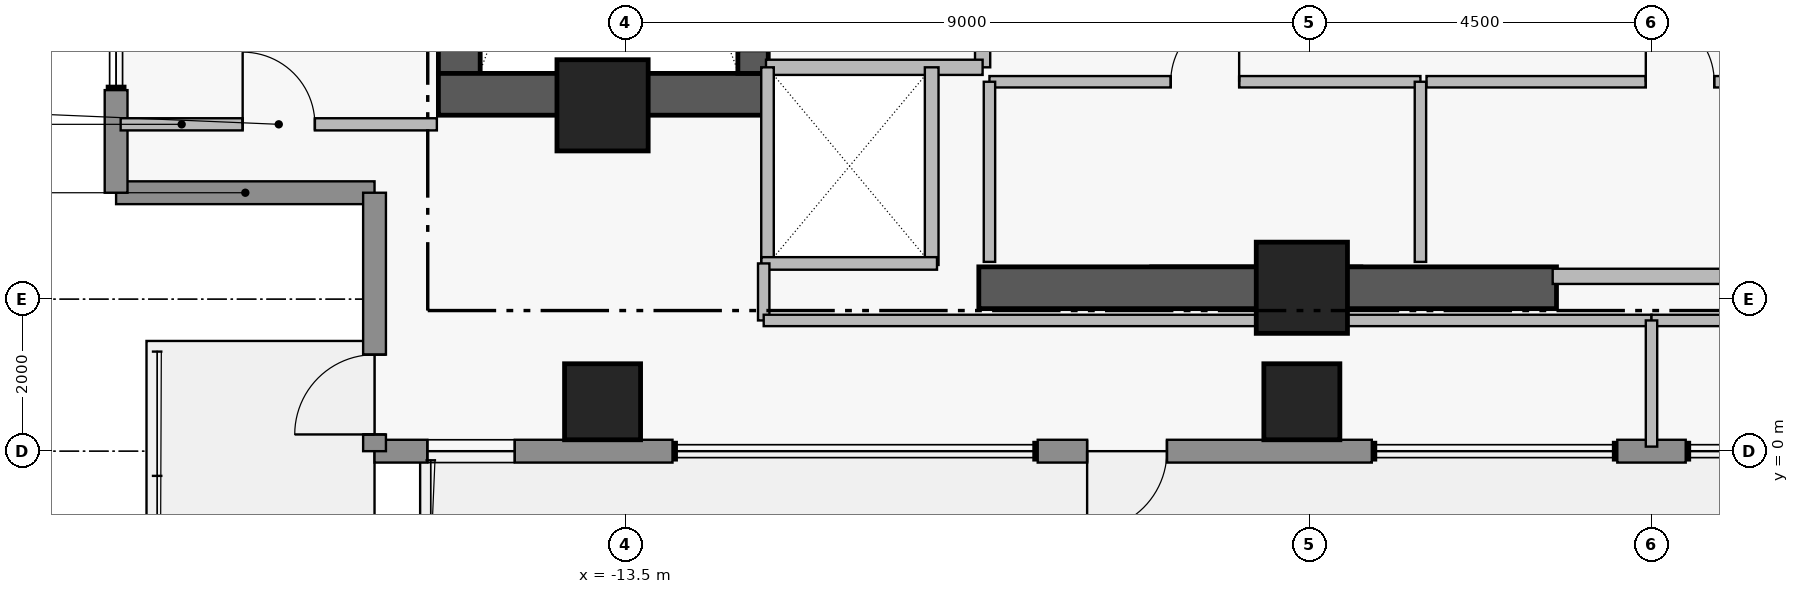
"""IFC4 building model, lengths in metres.
Left out: names, types, materials, properties, quantities, classifications, styles, units other than length and angle.
Written with IfcOpenShell. Run it as: python <this file> out.ifc"""

import sys

from ifc_helpers import new_model, si_unit, direction, frame, frame_2d, origin, origin_2d, place, context, subcontext, project, spatial, rectangle, extrude, element, fill, save


model = new_model("IFC4")
c1 = context("Model", 3, precision=1e-05, world=origin(), true_north=direction((0.0, 1.0)))
c2 = subcontext(c1, "Body", "Model", "MODEL_VIEW")
j1 = project(units=[si_unit("LENGTHUNIT", "METRE"), si_unit("PLANEANGLEUNIT", "RADIAN")], contexts=[c1])
p1 = place(None, origin())
s1 = spatial("IfcSite", under=j1, at=p1, CompositionType="ELEMENT")
p2 = place(p1, origin())
s2 = spatial("IfcBuilding", under=s1, at=p2, CompositionType="ELEMENT")
p3 = place(p2, frame((0.0, 0.0, 280.35)))
s3 = spatial("IfcBuildingStorey", under=s2, at=p3, CompositionType="ELEMENT", Elevation=280.35)
p4 = place(p3, frame((-15.685, 4.97, 0.0), z_axis=(0.0, 0.0, 1.0), x_axis=(0.0, 1.0, 0.0)))
e1 = element("IfcWall", 1, at=p4, inside=s3, PredefinedType="SHEAR", context=c2, shape_type="SweptSolid", body=[
    extrude(rectangle(XDim=8.96, YDim=0.55, at=frame_2d((4.48, 0.0))), origin(), (0.0, 0.0, 1.0), 3.51),
])
p5 = place(p3, frame((-15.96, 4.695, 0.0), z_axis=(0.0, 0.0, 1.0), x_axis=(1.0, 0.0, 0.0)))
e2 = element("IfcWall", 2, at=p5, inside=s3, PredefinedType="SHEAR", context=c2, shape_type="SweptSolid", body=[
    extrude(rectangle(XDim=4.36, YDim=0.55, at=frame_2d((2.18, 0.0))), origin(), (0.0, 0.0, 1.0), 3.51),
])
p6 = place(p3, frame((-8.85, 2.15, 0.0), z_axis=(0.0, 0.0, 1.0), x_axis=(1.0, 0.0, 0.0)))
e3 = element("IfcWall", 3, at=p6, inside=s3, PredefinedType="SHEAR", context=c2, shape_type="SweptSolid", body=[
    extrude(rectangle(XDim=7.6, YDim=0.55, at=frame_2d((3.8, 0.0))), origin(), (0.0, 0.0, 1.0), 3.48),
])
p7 = place(p3, frame((-11.82, 4.97, 0.0), z_axis=(0.0, 0.0, 1.0), x_axis=(0.0, 1.0, 0.0)))
e4 = element("IfcWall", 4, at=p7, inside=s3, PredefinedType="SHEAR", context=c2, shape_type="SweptSolid", body=[
    extrude(rectangle(XDim=8.96, YDim=0.4, at=frame_2d((4.48, 0.0))), origin(), (0.0, 0.0, 1.0), 3.51),
])
p8 = place(p7, frame((0.31, 0.0, 0.0)))
e5 = element("IfcOpeningElement", 5, at=p8, cuts=e4, PredefinedType="OPENING", context=c2, shape_type="SweptSolid", body=[
    extrude(rectangle(XDim=1.12, YDim=2.22, at=frame_2d((0.56, 1.11))), frame((0.0, 0.21, 0.0), z_axis=(0.0, -1.0, 0.0), x_axis=(1.0, 0.0, 0.0)), (0.0, 0.0, 1.0), 0.42),
])
for number, where, z_axis, x_axis in (
    (6, (-13.8, 4.55, 0.0), (0.0, 0.0, 1.0), (1.0, 0.0, 0.0)),
    (7, (-4.6, 2.15, 0.0), (0.0, 0.0, 1.0), (1.0, 0.0, 0.0)),
):
    element("IfcColumn", number, at=place(p3, frame(where, z_axis=z_axis, x_axis=x_axis)), inside=s3, PredefinedType="COLUMN", context=c2, shape_type="SweptSolid", body=[
        extrude(rectangle(XDim=1.2, YDim=1.2, at=origin_2d()), origin(), (0.0, 0.0, 1.0), 3.7),
    ])
for number, where, z_axis, x_axis in (
    (8, (-13.8, 0.65, 0.0), (0.0, 0.0, 1.0), (1.0, 0.0, 0.0)),
    (9, (-4.6, 0.65, 0.0), (0.0, 0.0, 1.0), (1.0, 0.0, 0.0)),
):
    element("IfcColumn", number, at=place(p3, frame(where, z_axis=z_axis, x_axis=x_axis)), inside=s3, PredefinedType="COLUMN", context=c2, shape_type="SweptSolid", body=[
        extrude(rectangle(XDim=1.0, YDim=1.0, at=origin_2d()), origin(), (0.0, 0.0, 1.0), 3.7),
    ])
p9 = place(p3, frame((-16.8, 3.4, 0.0), z_axis=(0.0, 0.0, 1.0), x_axis=(-1.0, 0.0, 0.0)))
e10 = element("IfcWall", 10, at=p9, inside=s3, PredefinedType="STANDARD", context=c2, shape_type="SweptSolid", body=[
    extrude(rectangle(XDim=3.4, YDim=0.3, at=frame_2d((1.7, 0.0))), origin(), (0.0, 0.0, 1.0), 3.48),
])
p10 = place(p3, frame((-20.2, 3.4, 0.0), z_axis=(0.0, 0.0, 1.0), x_axis=(0.0, 1.0, 0.0)))
e11 = element("IfcWall", 11, at=p10, inside=s3, PredefinedType="STANDARD", context=c2, shape_type="SweptSolid", body=[
    extrude(rectangle(XDim=1.35, YDim=0.3, at=frame_2d((0.675, 0.0))), origin(), (0.0, 0.0, 1.0), 3.48),
])
p11 = place(p3, frame((0.45, 0.0, 0.0), z_axis=(0.0, 0.0, 1.0), x_axis=(-1.0, 0.0, 0.0)))
e12 = element("IfcWall", 12, at=p11, inside=s3, PredefinedType="STANDARD", context=c2, shape_type="SweptSolid", body=[
    extrude(rectangle(XDim=0.9, YDim=0.3, at=frame_2d((0.45, 0.0))), origin(), (0.0, 0.0, 1.0), 3.48),
])
p12 = place(p3, frame((-3.68, 0.0, 0.0), z_axis=(0.0, 0.0, 1.0), x_axis=(-1.0, 0.0, 0.0)))
e13 = element("IfcWall", 13, at=p12, inside=s3, PredefinedType="STANDARD", context=c2, shape_type="SweptSolid", body=[
    extrude(rectangle(XDim=4.395, YDim=0.3, at=frame_2d((2.198, 0.0))), origin(), (0.0, 0.0, 1.0), 3.48),
])
p13 = place(p12, frame((2.695, 0.0, 0.0)))
e14 = element("IfcOpeningElement", 14, at=p13, cuts=e13, PredefinedType="OPENING", context=c2, shape_type="SweptSolid", body=[
    extrude(rectangle(XDim=1.05, YDim=2.2, at=frame_2d((0.525, 1.1))), frame((0.0, 0.16, 0.0), z_axis=(0.0, -1.0, 0.0), x_axis=(1.0, 0.0, 0.0)), (0.0, 0.0, 1.0), 0.32),
])
p14 = place(p3, frame((-12.88, 0.0, 0.0), z_axis=(0.0, 0.0, 1.0), x_axis=(-1.0, 0.0, 0.0)))
e15 = element("IfcWall", 15, at=p14, inside=s3, PredefinedType="STANDARD", context=c2, shape_type="SweptSolid", body=[
    extrude(rectangle(XDim=3.92, YDim=0.3, at=frame_2d((1.96, 0.0))), origin(), (0.0, 0.0, 1.0), 3.48),
])
p15 = place(p14, frame((2.075, 0.0, 0.95)))
e16 = element("IfcOpeningElement", 16, at=p15, cuts=e15, PredefinedType="OPENING", context=c2, shape_type="SweptSolid", body=[
    extrude(rectangle(XDim=1.15, YDim=1.55, at=frame_2d((0.575, 0.775))), frame((0.0, 0.16, 0.0), z_axis=(0.0, -1.0, 0.0), x_axis=(1.0, 0.0, 0.0)), (0.0, 0.0, 1.0), 0.32),
])
p16 = place(p3, frame((-16.8, 0.0, 0.0), z_axis=(0.0, 0.0, 1.0), x_axis=(0.0, 1.0, 0.0)))
e17 = element("IfcWall", 17, at=p16, inside=s3, PredefinedType="STANDARD", context=c2, shape_type="SweptSolid", body=[
    extrude(rectangle(XDim=3.4, YDim=0.3, at=frame_2d((1.7, 0.0))), origin(), (0.0, 0.0, 1.0), 3.48),
])
p17 = place(p16, frame((0.22, 0.0, 0.0)))
e18 = element("IfcOpeningElement", 18, at=p17, cuts=e17, PredefinedType="OPENING", context=c2, shape_type="SweptSolid", body=[
    extrude(rectangle(XDim=1.05, YDim=2.2, at=frame_2d((0.525, 1.1))), frame((0.0, 0.16, 0.0), z_axis=(0.0, -1.0, 0.0), x_axis=(1.0, 0.0, 0.0)), (0.0, 0.0, 1.0), 0.32),
])
p18 = place(p3, frame((-8.8, 5.05, 0.0), z_axis=(0.0, 0.0, 1.0), x_axis=(0.0, 1.0, 0.0)))
e19 = element("IfcWall", 19, at=p18, inside=s3, PredefinedType="PARTITIONING", context=c2, shape_type="SweptSolid", body=[
    extrude(rectangle(XDim=6.1, YDim=0.2, at=frame_2d((3.05, 0.0))), origin(), (0.0, 0.0, 1.0), 3.48),
])
p19 = place(p18, frame((0.25, 0.0, 0.0)))
e20 = element("IfcOpeningElement", 20, at=p19, cuts=e19, PredefinedType="OPENING", context=c2, shape_type="SweptSolid", body=[
    extrude(rectangle(XDim=1.1, YDim=2.2, at=frame_2d((0.55, 1.1))), frame((0.0, 0.11, 0.0), z_axis=(0.0, -1.0, 0.0), x_axis=(1.0, 0.0, 0.0)), (0.0, 0.0, 1.0), 0.22),
])
p20 = place(p18, frame((3.85, 0.0, 0.0)))
e21 = element("IfcOpeningElement", 21, at=p20, cuts=e19, PredefinedType="OPENING", context=c2, shape_type="SweptSolid", body=[
    extrude(rectangle(XDim=1.1, YDim=2.2, at=frame_2d((0.55, 1.1))), frame((0.0, 0.11, 0.0), z_axis=(0.0, -1.0, 0.0), x_axis=(1.0, 0.0, 0.0)), (0.0, 0.0, 1.0), 0.22),
])
p21 = place(p3, frame((-8.71, 4.86, 0.0), z_axis=(0.0, 0.0, 1.0), x_axis=(1.0, 0.0, 0.0)))
e22 = element("IfcWall", 22, at=p21, inside=s3, PredefinedType="PARTITIONING", context=c2, shape_type="SweptSolid", body=[
    extrude(rectangle(XDim=5.67, YDim=0.15, at=frame_2d((2.835, 0.0))), origin(), (0.0, 0.0, 1.0), 3.48),
])
p22 = place(p21, frame((2.385, 0.0, 0.0)))
e23 = element("IfcOpeningElement", 23, at=p22, cuts=e22, PredefinedType="OPENING", context=c2, shape_type="SweptSolid", body=[
    extrude(rectangle(XDim=0.9, YDim=2.15, at=frame_2d((0.45, 1.075))), frame((0.0, 0.085, 0.0), z_axis=(0.0, -1.0, 0.0), x_axis=(1.0, 0.0, 0.0)), (0.0, 0.0, 1.0), 0.17),
])
p23 = place(p3, frame((-2.96, 4.86, 0.0), z_axis=(0.0, 0.0, 1.0), x_axis=(1.0, 0.0, 0.0)))
e24 = element("IfcWall", 24, at=p23, inside=s3, PredefinedType="PARTITIONING", context=c2, shape_type="SweptSolid", body=[
    extrude(rectangle(XDim=6.67, YDim=0.15, at=frame_2d((3.335, 0.0))), origin(), (0.0, 0.0, 1.0), 3.48),
])
p24 = place(p23, frame((2.885, 0.0, 0.0)))
e25 = element("IfcOpeningElement", 25, at=p24, cuts=e24, PredefinedType="OPENING", context=c2, shape_type="SweptSolid", body=[
    extrude(rectangle(XDim=0.9, YDim=2.15, at=frame_2d((0.45, 1.075))), frame((0.0, 0.085, 0.0), z_axis=(0.0, -1.0, 0.0), x_axis=(1.0, 0.0, 0.0)), (0.0, 0.0, 1.0), 0.17),
])
p25 = place(p3, frame((-20.14, 4.3, 0.0), z_axis=(0.0, 0.0, 1.0), x_axis=(1.0, 0.0, 0.0)))
e26 = element("IfcWall", 26, at=p25, inside=s3, PredefinedType="PARTITIONING", context=c2, shape_type="SweptSolid", body=[
    extrude(rectangle(XDim=4.16, YDim=0.16, at=frame_2d((2.08, 0.0))), origin(), (0.0, 0.0, 1.0), 3.48),
])
p26 = place(p25, frame((1.605, 0.0, 0.0)))
e27 = element("IfcOpeningElement", 27, at=p26, cuts=e26, PredefinedType="OPENING", context=c2, shape_type="SweptSolid", body=[
    extrude(rectangle(XDim=0.95, YDim=2.15, at=frame_2d((0.475, 1.075))), frame((0.0, 0.09, 0.0), z_axis=(0.0, -1.0, 0.0), x_axis=(1.0, 0.0, 0.0)), (0.0, 0.0, 1.0), 0.18),
])
p27 = place(p3, frame((-11.65, 5.05, 0.0), z_axis=(0.0, 0.0, 1.0), x_axis=(1.0, 0.0, 0.0)))
e28 = element("IfcWall", 28, at=p27, inside=s3, PredefinedType="PARTITIONING", context=c2, shape_type="SweptSolid", body=[
    extrude(rectangle(XDim=2.85, YDim=0.2, at=frame_2d((1.425, 0.0))), origin(), (0.0, 0.0, 1.0), 3.48),
])
p28 = place(p3, frame((-1.3, 2.3, 0.0), z_axis=(0.0, 0.0, 1.0), x_axis=(1.0, 0.0, 0.0)))
e29 = element("IfcWall", 29, at=p28, inside=s3, PredefinedType="PARTITIONING", context=c2, shape_type="SweptSolid", body=[
    extrude(rectangle(XDim=2.6, YDim=0.2, at=frame_2d((1.3, 0.0))), origin(), (0.0, 0.0, 1.0), 2.38),
])
for number, where, z_axis, x_axis in (
    (30, (-8.71, 2.49, 0.0), (0.0, 0.0, 1.0), (0.0, 1.0, 0.0)),
    (31, (-3.04, 2.49, 0.0), (0.0, 0.0, 1.0), (0.0, 1.0, 0.0)),
):
    element("IfcWall", number, at=place(p3, frame(where, z_axis=z_axis, x_axis=x_axis)), inside=s3, PredefinedType="PARTITIONING", context=c2, shape_type="SweptSolid", body=[
        extrude(rectangle(XDim=2.37, YDim=0.15, at=frame_2d((1.185, 0.0))), origin(), (0.0, 0.0, 1.0), 3.48),
    ])
p29 = place(p3, frame((-9.47, 2.45, 0.0), z_axis=(0.0, 0.0, 1.0), x_axis=(0.0, 1.0, 0.0)))
e32 = element("IfcWall", 32, at=p29, inside=s3, PredefinedType="PARTITIONING", context=c2, shape_type="SweptSolid", body=[
    extrude(rectangle(XDim=2.6, YDim=0.18, at=frame_2d((1.3, 0.0))), origin(), (0.0, 0.0, 1.0), 3.48),
])
p30 = place(p3, frame((-11.63, 2.47, 0.0), z_axis=(0.0, 0.0, 1.0), x_axis=(0.0, 1.0, 0.0)))
e33 = element("IfcWall", 33, at=p30, inside=s3, PredefinedType="PARTITIONING", context=c2, shape_type="SweptSolid", body=[
    extrude(rectangle(XDim=2.58, YDim=0.165, at=frame_2d((1.29, 0.0))), origin(), (0.0, 0.0, 1.0), 3.48),
])
p31 = place(p3, frame((-11.71, 2.47, 0.0), z_axis=(0.0, 0.0, 1.0), x_axis=(1.0, 0.0, 0.0)))
e34 = element("IfcWall", 34, at=p31, inside=s3, PredefinedType="PARTITIONING", context=c2, shape_type="SweptSolid", body=[
    extrude(rectangle(XDim=2.31, YDim=0.165, at=frame_2d((1.155, 0.0))), origin(), (0.0, 0.0, 1.0), 2.38),
])
p32 = place(p3, frame((-11.68, 1.72, 0.0), z_axis=(0.0, 0.0, 1.0), x_axis=(0.0, 1.0, 0.0)))
e35 = element("IfcWall", 35, at=p32, inside=s3, PredefinedType="PARTITIONING", context=c2, shape_type="SweptSolid", body=[
    extrude(rectangle(XDim=0.75, YDim=0.15, at=frame_2d((0.375, 0.0))), origin(), (0.0, 0.0, 1.0), 3.48),
])
for number, where, z_axis, x_axis in (
    (36, (-11.68, 1.72, 0.0), (0.0, 0.0, 1.0), (1.0, 0.0, 0.0)),
    (37, (0.0, 1.72, 0.0), (0.0, 0.0, 1.0), (1.0, 0.0, 0.0)),
):
    element("IfcWall", number, at=place(p3, frame(where, z_axis=z_axis, x_axis=x_axis)), inside=s3, PredefinedType="PARTITIONING", context=c2, shape_type="SweptSolid", body=[
        extrude(rectangle(XDim=11.68, YDim=0.15, at=frame_2d((5.84, 0.0))), origin(), (0.0, 0.0, 1.0), 2.38),
    ])
p33 = place(p3, frame((0.0, 0.06, 0.0), z_axis=(0.0, 0.0, 1.0), x_axis=(0.0, 1.0, 0.0)))
e38 = element("IfcWall", 38, at=p33, inside=s3, PredefinedType="PARTITIONING", context=c2, shape_type="SweptSolid", body=[
    extrude(rectangle(XDim=1.66, YDim=0.15, at=frame_2d((0.83, 0.0))), origin(), (0.0, 0.0, 1.0), 3.48),
])
p34 = place(p13, origin())
e39 = element("IfcDoor", 39, at=p34, inside=s3, OperationType="SINGLE_SWING_RIGHT", PredefinedType="DOOR", context=c2, shape_type="SweptSolid", body=[
    extrude(rectangle(XDim=1.05, YDim=2.2, at=frame_2d((0.525, 1.1))), frame((0.0, 0.025, 0.0), z_axis=(0.0, -1.0, 0.0), x_axis=(1.0, 0.0, 0.0)), (0.0, 0.0, 1.0), 0.05),
])
fill(e14, e39)
p35 = place(p15, origin())
e40 = element("IfcWindow", 40, at=p35, inside=s3, PartitioningType="SINGLE_PANEL", PredefinedType="WINDOW", context=c2, shape_type="SweptSolid", body=[
    extrude(rectangle(XDim=1.15, YDim=1.55, at=frame_2d((0.575, 0.775))), frame((0.0, 0.03, 0.0), z_axis=(0.0, -1.0, 0.0), x_axis=(1.0, 0.0, 0.0)), (0.0, 0.0, 1.0), 0.06),
])
fill(e16, e40)
p36 = place(p17, origin())
e41 = element("IfcDoor", 41, at=p36, inside=s3, OperationType="SINGLE_SWING_LEFT", PredefinedType="DOOR", context=c2, shape_type="SweptSolid", body=[
    extrude(rectangle(XDim=1.05, YDim=2.2, at=frame_2d((0.525, 1.1))), frame((0.0, 0.025, 0.0), z_axis=(0.0, -1.0, 0.0), x_axis=(1.0, 0.0, 0.0)), (0.0, 0.0, 1.0), 0.05),
])
fill(e18, e41)
p37 = place(p22, origin())
e42 = element("IfcDoor", 42, at=p37, inside=s3, OperationType="SINGLE_SWING_RIGHT", PredefinedType="DOOR", context=c2, shape_type="SweptSolid", body=[
    extrude(rectangle(XDim=0.9, YDim=2.15, at=frame_2d((0.45, 1.075))), frame((0.0, 0.025, 0.0), z_axis=(0.0, -1.0, 0.0), x_axis=(1.0, 0.0, 0.0)), (0.0, 0.0, 1.0), 0.05),
])
fill(e23, e42)
p38 = place(p24, origin())
e43 = element("IfcDoor", 43, at=p38, inside=s3, OperationType="SINGLE_SWING_LEFT", PredefinedType="DOOR", context=c2, shape_type="SweptSolid", body=[
    extrude(rectangle(XDim=0.9, YDim=2.15, at=frame_2d((0.45, 1.075))), frame((0.0, 0.025, 0.0), z_axis=(0.0, -1.0, 0.0), x_axis=(1.0, 0.0, 0.0)), (0.0, 0.0, 1.0), 0.05),
])
fill(e25, e43)
p39 = place(p26, origin())
e44 = element("IfcDoor", 44, at=p39, inside=s3, OperationType="SINGLE_SWING_LEFT", PredefinedType="DOOR", context=c2, shape_type="SweptSolid", body=[
    extrude(rectangle(XDim=0.95, YDim=2.15, at=frame_2d((0.475, 1.075))), frame((0.0, 0.025, 0.0), z_axis=(0.0, -1.0, 0.0), x_axis=(1.0, 0.0, 0.0)), (0.0, 0.0, 1.0), 0.05),
])
fill(e27, e44)
save(model, sys.argv[1])
